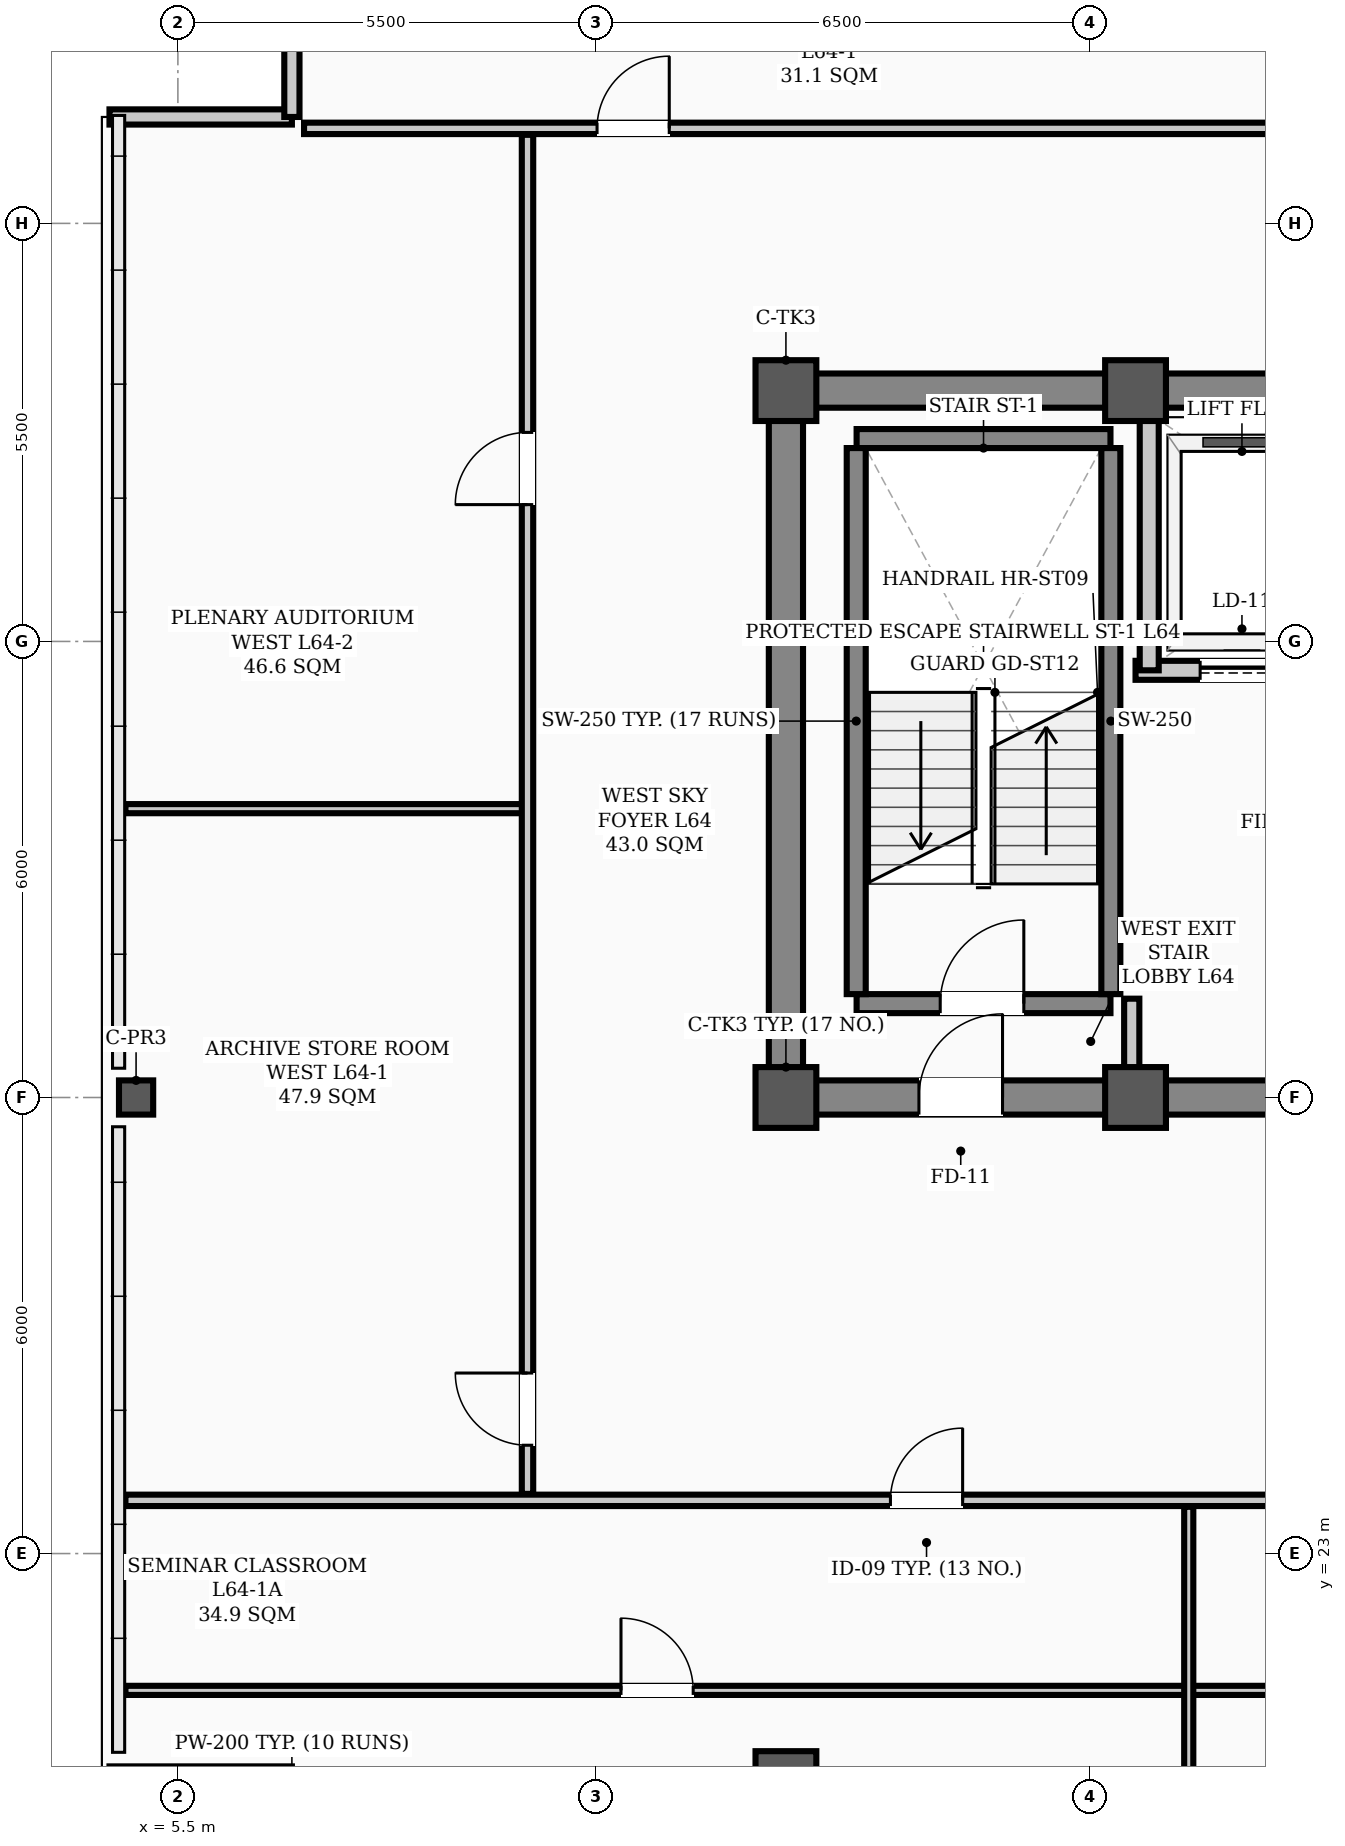
"""IFC4 building model, lengths in metres.
Left out: names, types, materials, properties, quantities, classifications, styles, units other than length and angle.
Written with IfcOpenShell. Run it as: python <this file> out.ifc"""

import sys

from ifc_helpers import new_model, si_unit, direction, frame, frame_2d, origin, origin_2d, place, context, subcontext, project, spatial, rectangle, hollow_rectangle, extrude, element, fill, save


model = new_model("IFC4")
c1 = context("Model", 3, precision=1e-05, world=origin(), true_north=direction((0.0, 1.0)))
c2 = subcontext(c1, "Body", "Model", "MODEL_VIEW")
j1 = project(units=[si_unit("LENGTHUNIT", "METRE"), si_unit("PLANEANGLEUNIT", "RADIAN")], contexts=[c1])
p1 = place(None, origin())
s1 = spatial("IfcSite", under=j1, at=p1, CompositionType="ELEMENT")
p2 = place(p1, origin())
s2 = spatial("IfcBuilding", under=s1, at=p2, CompositionType="ELEMENT")
p3 = place(p2, frame((0.0, 0.0, 257.9)))
s3 = spatial("IfcBuildingStorey", under=s2, at=p3, CompositionType="ELEMENT", Elevation=257.9)
for number, where, z_axis, x_axis in (
    (1, (13.5, 29.0, 0.0), (0.0, 0.0, 1.0), (1.0, 0.0, 0.0)),
    (2, (13.5, 38.3, 0.0), (0.0, 0.0, 1.0), (1.0, 0.0, 0.0)),
    (3, (18.1, 29.0, 0.0), (0.0, 0.0, 1.0), (1.0, 0.0, 0.0)),
    (4, (18.1, 38.3, 0.0), (0.0, 0.0, 1.0), (1.0, 0.0, 0.0)),
    (5, (13.5, 20.0, 0.0), (0.0, 0.0, 1.0), (1.0, 0.0, 0.0)),
):
    element("IfcColumn", number, at=place(p3, frame(where, z_axis=z_axis, x_axis=x_axis)), inside=s3, PredefinedType="COLUMN", context=c2, shape_type="SweptSolid", body=[
        extrude(hollow_rectangle(XDim=0.8, YDim=0.8, WallThickness=0.032, InnerFilletRadius=0.016, OuterFilletRadius=0.048, at=origin_2d()), origin(), (0.0, 0.0, 1.0), 3.9),
    ])
p4 = place(p3, frame((4.95, 29.0, 0.0), z_axis=(0.0, 0.0, 1.0), x_axis=(1.0, 0.0, 0.0)))
e6 = element("IfcColumn", 6, at=p4, inside=s3, PredefinedType="COLUMN", context=c2, shape_type="SweptSolid", body=[
    extrude(hollow_rectangle(XDim=0.45, YDim=0.45, WallThickness=0.022, InnerFilletRadius=0.022, OuterFilletRadius=0.044, at=origin_2d()), origin(), (0.0, 0.0, 1.0), 3.9),
])
for number, where, z_axis, x_axis in (
    (7, (4.6, 20.1, 0.0), (0.0, 0.0, 1.0), (1.0, 0.0, 0.0)),
    (8, (4.6, 41.9, 0.0), (0.0, 0.0, 1.0), (1.0, 0.0, 0.0)),
):
    element("IfcWall", number, at=place(p3, frame(where, z_axis=z_axis, x_axis=x_axis)), inside=s3, PredefinedType="PARAPET", context=c2, shape_type="SweptSolid", body=[
        extrude(rectangle(XDim=2.4, YDim=0.2, at=frame_2d((1.2, 0.0))), origin(), (0.0, 0.0, 1.0), 1.2),
    ])
p5 = place(p3, frame((7.0, 41.9, 0.0), z_axis=(0.0, 0.0, 1.0), x_axis=(0.0, 1.0, 0.0)))
e9 = element("IfcWall", 9, at=p5, inside=s3, PredefinedType="PARAPET", context=c2, shape_type="SweptSolid", body=[
    extrude(rectangle(XDim=2.4, YDim=0.2, at=frame_2d((1.2, 0.0))), origin(), (0.0, 0.0, 1.0), 1.2),
])
p6 = place(p3, frame((13.5, 29.0, 0.0), z_axis=(0.0, 0.0, 1.0), x_axis=(1.0, 0.0, 0.0)))
e10 = element("IfcWall", 10, at=p6, inside=s3, PredefinedType="SHEAR", context=c2, shape_type="SweptSolid", body=[
    extrude(rectangle(XDim=30.5, YDim=0.45, at=frame_2d((15.25, 0.0))), origin(), (0.0, 0.0, 1.0), 3.72),
])
p7 = place(p6, frame((1.75, 0.0, 0.0)))
e11 = element("IfcOpeningElement", 11, at=p7, cuts=e10, PredefinedType="OPENING", context=c2, shape_type="SweptSolid", body=[
    extrude(rectangle(XDim=1.1, YDim=2.08, at=frame_2d((0.55, 1.04))), frame((0.0, 0.235, 0.0), z_axis=(0.0, -1.0, 0.0), x_axis=(1.0, 0.0, 0.0)), (0.0, 0.0, 1.0), 0.47),
])
p8 = place(p6, frame((26.7, 0.0, 0.0)))
e12 = element("IfcOpeningElement", 12, at=p8, cuts=e10, PredefinedType="OPENING", context=c2, shape_type="SweptSolid", body=[
    extrude(rectangle(XDim=1.1, YDim=2.08, at=frame_2d((0.55, 1.04))), frame((0.0, 0.235, 0.0), z_axis=(0.0, -1.0, 0.0), x_axis=(1.0, 0.0, 0.0)), (0.0, 0.0, 1.0), 0.47),
])
p9 = place(p6, frame((6.8, 0.0, 0.0)))
e13 = element("IfcOpeningElement", 13, at=p9, cuts=e10, PredefinedType="OPENING", context=c2, shape_type="SweptSolid", body=[
    extrude(rectangle(XDim=1.1, YDim=2.08, at=frame_2d((0.55, 1.04))), frame((0.0, 0.235, 0.0), z_axis=(0.0, -1.0, 0.0), x_axis=(1.0, 0.0, 0.0)), (0.0, 0.0, 1.0), 0.47),
])
p10 = place(p6, frame((13.2, 0.0, 0.0)))
e14 = element("IfcOpeningElement", 14, at=p10, cuts=e10, PredefinedType="OPENING", context=c2, shape_type="SweptSolid", body=[
    extrude(rectangle(XDim=1.6, YDim=2.08, at=frame_2d((0.8, 1.04))), frame((0.0, 0.235, 0.0), z_axis=(0.0, -1.0, 0.0), x_axis=(1.0, 0.0, 0.0)), (0.0, 0.0, 1.0), 0.47),
])
p11 = place(p6, frame((19.53, 0.0, 0.0)))
e15 = element("IfcOpeningElement", 15, at=p11, cuts=e10, PredefinedType="OPENING", context=c2, shape_type="SweptSolid", body=[
    extrude(rectangle(XDim=0.9, YDim=2.08, at=frame_2d((0.45, 1.04))), frame((0.0, 0.235, 0.0), z_axis=(0.0, -1.0, 0.0), x_axis=(1.0, 0.0, 0.0)), (0.0, 0.0, 1.0), 0.47),
])
p12 = place(p6, frame((21.57, 0.0, 0.0)))
e16 = element("IfcOpeningElement", 16, at=p12, cuts=e10, PredefinedType="OPENING", context=c2, shape_type="SweptSolid", body=[
    extrude(rectangle(XDim=0.9, YDim=2.08, at=frame_2d((0.45, 1.04))), frame((0.0, 0.235, 0.0), z_axis=(0.0, -1.0, 0.0), x_axis=(1.0, 0.0, 0.0)), (0.0, 0.0, 1.0), 0.47),
])
p13 = place(p3, frame((13.5, 38.3, 0.0), z_axis=(0.0, 0.0, 1.0), x_axis=(1.0, 0.0, 0.0)))
e17 = element("IfcWall", 17, at=p13, inside=s3, PredefinedType="SHEAR", context=c2, shape_type="SweptSolid", body=[
    extrude(rectangle(XDim=30.5, YDim=0.45, at=frame_2d((15.25, 0.0))), origin(), (0.0, 0.0, 1.0), 3.72),
])
p14 = place(p3, frame((13.5, 29.35, 0.0), z_axis=(0.0, 0.0, 1.0), x_axis=(0.0, 1.0, 0.0)))
e18 = element("IfcWall", 18, at=p14, inside=s3, PredefinedType="SHEAR", context=c2, shape_type="SweptSolid", body=[
    extrude(rectangle(XDim=8.6, YDim=0.45, at=frame_2d((4.3, 0.0))), origin(), (0.0, 0.0, 1.0), 3.72),
])
p15 = place(p3, frame((14.43, 30.235, 0.0), z_axis=(0.0, 0.0, 1.0), x_axis=(1.0, 0.0, 0.0)))
e19 = element("IfcWall", 19, at=p15, inside=s3, PredefinedType="STANDARD", context=c2, shape_type="SweptSolid", body=[
    extrude(rectangle(XDim=3.34, YDim=0.25, at=frame_2d((1.67, 0.0))), origin(), (0.0, 0.0, 1.0), 3.72),
])
p16 = place(p15, frame((1.1, 0.0, 0.0)))
e20 = element("IfcOpeningElement", 20, at=p16, cuts=e19, PredefinedType="OPENING", context=c2, shape_type="SweptSolid", body=[
    extrude(rectangle(XDim=1.1, YDim=2.08, at=frame_2d((0.55, 1.04))), frame((0.0, 0.135, 0.0), z_axis=(0.0, -1.0, 0.0), x_axis=(1.0, 0.0, 0.0)), (0.0, 0.0, 1.0), 0.27),
])
p17 = place(p3, frame((14.43, 37.669, 0.0), z_axis=(0.0, 0.0, 1.0), x_axis=(1.0, 0.0, 0.0)))
e21 = element("IfcWall", 21, at=p17, inside=s3, PredefinedType="STANDARD", context=c2, shape_type="SweptSolid", body=[
    extrude(rectangle(XDim=3.34, YDim=0.25, at=frame_2d((1.67, 0.0))), origin(), (0.0, 0.0, 1.0), 3.72),
])
for number, where, z_axis, x_axis in (
    (22, (14.425, 30.36, 0.0), (0.0, 0.0, 1.0), (0.0, 1.0, 0.0)),
    (23, (17.775, 30.36, 0.0), (0.0, 0.0, 1.0), (0.0, 1.0, 0.0)),
):
    element("IfcWall", number, at=place(p3, frame(where, z_axis=z_axis, x_axis=x_axis)), inside=s3, PredefinedType="STANDARD", context=c2, shape_type="SweptSolid", body=[
        extrude(rectangle(XDim=7.184, YDim=0.25, at=frame_2d((3.592, 0.0))), origin(), (0.0, 0.0, 1.0), 3.72),
    ])
p18 = place(p3, frame((18.1, 34.62, 0.0), z_axis=(0.0, 0.0, 1.0), x_axis=(1.0, 0.0, 0.0)))
e24 = element("IfcWall", 24, at=p18, inside=s3, PredefinedType="STANDARD", context=c2, shape_type="SweptSolid", body=[
    extrude(rectangle(XDim=5.35, YDim=0.25, at=frame_2d((2.675, 0.0))), origin(), (0.0, 0.0, 1.0), 3.72),
])
p19 = place(p18, frame((0.85, 0.0, 0.0)))
e25 = element("IfcOpeningElement", 25, at=p19, cuts=e24, PredefinedType="OPENING", context=c2, shape_type="SweptSolid", body=[
    extrude(rectangle(XDim=1.1, YDim=2.08, at=frame_2d((0.55, 1.04))), frame((0.0, 0.135, 0.0), z_axis=(0.0, -1.0, 0.0), x_axis=(1.0, 0.0, 0.0)), (0.0, 0.0, 1.0), 0.27),
])
p20 = place(p18, frame((3.45, 0.0, 0.0)))
e26 = element("IfcOpeningElement", 26, at=p20, cuts=e24, PredefinedType="OPENING", context=c2, shape_type="SweptSolid", body=[
    extrude(rectangle(XDim=1.1, YDim=2.08, at=frame_2d((0.55, 1.04))), frame((0.0, 0.135, 0.0), z_axis=(0.0, -1.0, 0.0), x_axis=(1.0, 0.0, 0.0)), (0.0, 0.0, 1.0), 0.27),
])
p21 = place(p3, frame((18.28, 34.62, 0.0), z_axis=(0.0, 0.0, 1.0), x_axis=(0.0, 1.0, 0.0)))
e27 = element("IfcWall", 27, at=p21, inside=s3, PredefinedType="STANDARD", context=c2, shape_type="SweptSolid", body=[
    extrude(rectangle(XDim=3.33, YDim=0.25, at=frame_2d((1.665, 0.0))), origin(), (0.0, 0.0, 1.0), 3.4),
])
p22 = place(p3, frame((4.81, 23.7, 0.0), z_axis=(0.0, 0.0, 1.0), x_axis=(1.0, 0.0, 0.0)))
e28 = element("IfcWall", 28, at=p22, inside=s3, PredefinedType="PARTITIONING", context=c2, shape_type="SweptSolid", body=[
    extrude(rectangle(XDim=40.88, YDim=0.15, at=frame_2d((20.44, 0.0))), origin(), (0.0, 0.0, 1.0), 3.2),
])
p23 = place(p22, frame((10.065, 0.0, 0.0)))
e29 = element("IfcOpeningElement", 29, at=p23, cuts=e28, PredefinedType="OPENING", context=c2, shape_type="SweptSolid", body=[
    extrude(rectangle(XDim=0.95, YDim=2.08, at=frame_2d((0.475, 1.04))), frame((0.0, 0.085, 0.0), z_axis=(0.0, -1.0, 0.0), x_axis=(1.0, 0.0, 0.0)), (0.0, 0.0, 1.0), 0.17),
])
p24 = place(p22, frame((16.415, 0.0, 0.0)))
e30 = element("IfcOpeningElement", 30, at=p24, cuts=e28, PredefinedType="OPENING", context=c2, shape_type="SweptSolid", body=[
    extrude(rectangle(XDim=0.95, YDim=2.08, at=frame_2d((0.475, 1.04))), frame((0.0, 0.085, 0.0), z_axis=(0.0, -1.0, 0.0), x_axis=(1.0, 0.0, 0.0)), (0.0, 0.0, 1.0), 0.17),
])
p25 = place(p22, frame((23.815, 0.0, 0.0)))
e31 = element("IfcOpeningElement", 31, at=p25, cuts=e28, PredefinedType="OPENING", context=c2, shape_type="SweptSolid", body=[
    extrude(rectangle(XDim=0.95, YDim=2.08, at=frame_2d((0.475, 1.04))), frame((0.0, 0.085, 0.0), z_axis=(0.0, -1.0, 0.0), x_axis=(1.0, 0.0, 0.0)), (0.0, 0.0, 1.0), 0.17),
])
p26 = place(p22, frame((35.26, 0.0, 0.0)))
e32 = element("IfcOpeningElement", 32, at=p26, cuts=e28, PredefinedType="OPENING", context=c2, shape_type="SweptSolid", body=[
    extrude(rectangle(XDim=0.95, YDim=2.08, at=frame_2d((0.475, 1.04))), frame((0.0, 0.085, 0.0), z_axis=(0.0, -1.0, 0.0), x_axis=(1.0, 0.0, 0.0)), (0.0, 0.0, 1.0), 0.17),
])
p27 = place(p3, frame((4.81, 21.2, 0.0), z_axis=(0.0, 0.0, 1.0), x_axis=(1.0, 0.0, 0.0)))
e33 = element("IfcWall", 33, at=p27, inside=s3, PredefinedType="PARTITIONING", context=c2, shape_type="SweptSolid", body=[
    extrude(rectangle(XDim=13.99, YDim=0.12, at=frame_2d((6.995, 0.0))), origin(), (0.0, 0.0, 1.0), 3.2),
])
p28 = place(p27, frame((6.52, 0.0, 0.0)))
e34 = element("IfcOpeningElement", 34, at=p28, cuts=e33, PredefinedType="OPENING", context=c2, shape_type="SweptSolid", body=[
    extrude(rectangle(XDim=0.95, YDim=2.08, at=frame_2d((0.475, 1.04))), frame((0.0, 0.07, 0.0), z_axis=(0.0, -1.0, 0.0), x_axis=(1.0, 0.0, 0.0)), (0.0, 0.0, 1.0), 0.14),
])
p29 = place(p3, frame((18.8, 21.2, 0.0), z_axis=(0.0, 0.0, 1.0), x_axis=(1.0, 0.0, 0.0)))
e35 = element("IfcWall", 35, at=p29, inside=s3, PredefinedType="PARTITIONING", context=c2, shape_type="SweptSolid", body=[
    extrude(rectangle(XDim=5.8, YDim=0.12, at=frame_2d((2.9, 0.0))), origin(), (0.0, 0.0, 1.0), 3.2),
])
p30 = place(p29, frame((2.425, 0.0, 0.0)))
e36 = element("IfcOpeningElement", 36, at=p30, cuts=e35, PredefinedType="OPENING", context=c2, shape_type="SweptSolid", body=[
    extrude(rectangle(XDim=0.95, YDim=2.08, at=frame_2d((0.475, 1.04))), frame((0.0, 0.07, 0.0), z_axis=(0.0, -1.0, 0.0), x_axis=(1.0, 0.0, 0.0)), (0.0, 0.0, 1.0), 0.14),
])
p31 = place(p3, frame((4.81, 32.8, 0.0), z_axis=(0.0, 0.0, 1.0), x_axis=(1.0, 0.0, 0.0)))
e37 = element("IfcWall", 37, at=p31, inside=s3, PredefinedType="PARTITIONING", context=c2, shape_type="SweptSolid", body=[
    extrude(rectangle(XDim=5.29, YDim=0.12, at=frame_2d((2.645, 0.0))), origin(), (0.0, 0.0, 1.0), 3.72),
])
p32 = place(p3, frame((7.16, 41.75, 0.0), z_axis=(0.0, 0.0, 1.0), x_axis=(1.0, 0.0, 0.0)))
e38 = element("IfcWall", 38, at=p32, inside=s3, PredefinedType="PARTITIONING", context=c2, shape_type="SweptSolid", body=[
    extrude(rectangle(XDim=36.18, YDim=0.15, at=frame_2d((18.09, 0.0))), origin(), (0.0, 0.0, 1.0), 3.2),
])
p33 = place(p32, frame((3.855, 0.0, 0.0)))
e39 = element("IfcOpeningElement", 39, at=p33, cuts=e38, PredefinedType="OPENING", context=c2, shape_type="SweptSolid", body=[
    extrude(rectangle(XDim=0.95, YDim=2.08, at=frame_2d((0.475, 1.04))), frame((0.0, 0.085, 0.0), z_axis=(0.0, -1.0, 0.0), x_axis=(1.0, 0.0, 0.0)), (0.0, 0.0, 1.0), 0.17),
])
p34 = place(p32, frame((18.665, 0.0, 0.0)))
e40 = element("IfcOpeningElement", 40, at=p34, cuts=e38, PredefinedType="OPENING", context=c2, shape_type="SweptSolid", body=[
    extrude(rectangle(XDim=0.95, YDim=2.08, at=frame_2d((0.475, 1.04))), frame((0.0, 0.085, 0.0), z_axis=(0.0, -1.0, 0.0), x_axis=(1.0, 0.0, 0.0)), (0.0, 0.0, 1.0), 0.17),
])
p35 = place(p32, frame((26.765, 0.0, 0.0)))
e41 = element("IfcOpeningElement", 41, at=p35, cuts=e38, PredefinedType="OPENING", context=c2, shape_type="SweptSolid", body=[
    extrude(rectangle(XDim=0.95, YDim=2.08, at=frame_2d((0.475, 1.04))), frame((0.0, 0.085, 0.0), z_axis=(0.0, -1.0, 0.0), x_axis=(1.0, 0.0, 0.0)), (0.0, 0.0, 1.0), 0.17),
])
p36 = place(p32, frame((33.765, 0.0, 0.0)))
e42 = element("IfcOpeningElement", 42, at=p36, cuts=e38, PredefinedType="OPENING", context=c2, shape_type="SweptSolid", body=[
    extrude(rectangle(XDim=0.95, YDim=2.08, at=frame_2d((0.475, 1.04))), frame((0.0, 0.085, 0.0), z_axis=(0.0, -1.0, 0.0), x_axis=(1.0, 0.0, 0.0)), (0.0, 0.0, 1.0), 0.17),
])
p37 = place(p3, frame((18.05, 29.235, 0.0), z_axis=(0.0, 0.0, 1.0), x_axis=(0.0, 1.0, 0.0)))
e43 = element("IfcWall", 43, at=p37, inside=s3, PredefinedType="STANDARD", context=c2, shape_type="SweptSolid", body=[
    extrude(rectangle(XDim=1.065, YDim=0.2, at=frame_2d((0.532, 0.0))), origin(), (0.0, 0.0, 1.0), 3.4),
])
p38 = place(p3, frame((10.1, 23.785, 0.0), z_axis=(0.0, 0.0, 1.0), x_axis=(0.0, 1.0, 0.0)))
e44 = element("IfcWall", 44, at=p38, inside=s3, PredefinedType="PARTITIONING", context=c2, shape_type="SweptSolid", body=[
    extrude(rectangle(XDim=17.88, YDim=0.15, at=frame_2d((8.94, 0.0))), origin(), (0.0, 0.0, 1.0), 3.1),
])
p39 = place(p38, frame((0.64, 0.0, 0.0)))
e45 = element("IfcOpeningElement", 45, at=p39, cuts=e44, PredefinedType="OPENING", context=c2, shape_type="SweptSolid", body=[
    extrude(rectangle(XDim=0.95, YDim=2.08, at=frame_2d((0.475, 1.04))), frame((0.0, 0.085, 0.0), z_axis=(0.0, -1.0, 0.0), x_axis=(1.0, 0.0, 0.0)), (0.0, 0.0, 1.0), 0.17),
])
p40 = place(p38, frame((13.015, 0.0, 0.0)))
e46 = element("IfcOpeningElement", 46, at=p40, cuts=e44, PredefinedType="OPENING", context=c2, shape_type="SweptSolid", body=[
    extrude(rectangle(XDim=0.95, YDim=2.08, at=frame_2d((0.475, 1.04))), frame((0.0, 0.085, 0.0), z_axis=(0.0, -1.0, 0.0), x_axis=(1.0, 0.0, 0.0)), (0.0, 0.0, 1.0), 0.17),
])
p41 = place(p3, frame((18.8, 17.91, 0.0), z_axis=(0.0, 0.0, 1.0), x_axis=(0.0, 1.0, 0.0)))
e47 = element("IfcWall", 47, at=p41, inside=s3, PredefinedType="PARTITIONING", context=c2, shape_type="SweptSolid", body=[
    extrude(rectangle(XDim=5.705, YDim=0.12, at=frame_2d((2.853, 0.0))), origin(), (0.0, 0.0, 1.0), 3.1),
])
p42 = place(p16, origin())
e48 = element("IfcDoor", 48, at=p42, inside=s3, OperationType="SINGLE_SWING_RIGHT", PredefinedType="DOOR", context=c2, shape_type="SweptSolid", body=[
    extrude(rectangle(XDim=1.1, YDim=2.08, at=frame_2d((0.55, 1.04))), frame((0.0, 0.025, 0.0), z_axis=(0.0, -1.0, 0.0), x_axis=(1.0, 0.0, 0.0)), (0.0, 0.0, 1.0), 0.05),
])
fill(e20, e48)
p43 = place(p7, origin())
e49 = element("IfcDoor", 49, at=p43, inside=s3, OperationType="SINGLE_SWING_RIGHT", PredefinedType="DOOR", context=c2, shape_type="SweptSolid", body=[
    extrude(rectangle(XDim=1.1, YDim=2.08, at=frame_2d((0.55, 1.04))), frame((0.0, 0.025, 0.0), z_axis=(0.0, -1.0, 0.0), x_axis=(1.0, 0.0, 0.0)), (0.0, 0.0, 1.0), 0.05),
])
fill(e11, e49)
p44 = place(p28, origin())
e50 = element("IfcDoor", 50, at=p44, inside=s3, OperationType="SINGLE_SWING_LEFT", PredefinedType="DOOR", context=c2, shape_type="SweptSolid", body=[
    extrude(rectangle(XDim=0.95, YDim=2.08, at=frame_2d((0.475, 1.04))), frame((0.0, 0.025, 0.0), z_axis=(0.0, -1.0, 0.0), x_axis=(1.0, 0.0, 0.0)), (0.0, 0.0, 1.0), 0.05),
])
fill(e34, e50)
p45 = place(p23, origin())
e51 = element("IfcDoor", 51, at=p45, inside=s3, OperationType="SINGLE_SWING_RIGHT", PredefinedType="DOOR", context=c2, shape_type="SweptSolid", body=[
    extrude(rectangle(XDim=0.95, YDim=2.08, at=frame_2d((0.475, 1.04))), frame((0.0, 0.025, 0.0), z_axis=(0.0, -1.0, 0.0), x_axis=(1.0, 0.0, 0.0)), (0.0, 0.0, 1.0), 0.05),
])
fill(e29, e51)
p46 = place(p39, origin())
e52 = element("IfcDoor", 52, at=p46, inside=s3, OperationType="SINGLE_SWING_RIGHT", PredefinedType="DOOR", context=c2, shape_type="SweptSolid", body=[
    extrude(rectangle(XDim=0.95, YDim=2.08, at=frame_2d((0.475, 1.04))), frame((0.0, 0.025, 0.0), z_axis=(0.0, -1.0, 0.0), x_axis=(1.0, 0.0, 0.0)), (0.0, 0.0, 1.0), 0.05),
])
fill(e45, e52)
p47 = place(p40, origin())
e53 = element("IfcDoor", 53, at=p47, inside=s3, OperationType="SINGLE_SWING_LEFT", PredefinedType="DOOR", context=c2, shape_type="SweptSolid", body=[
    extrude(rectangle(XDim=0.95, YDim=2.08, at=frame_2d((0.475, 1.04))), frame((0.0, 0.025, 0.0), z_axis=(0.0, -1.0, 0.0), x_axis=(1.0, 0.0, 0.0)), (0.0, 0.0, 1.0), 0.05),
])
fill(e46, e53)
p48 = place(p33, origin())
e54 = element("IfcDoor", 54, at=p48, inside=s3, OperationType="SINGLE_SWING_RIGHT", PredefinedType="DOOR", context=c2, shape_type="SweptSolid", body=[
    extrude(rectangle(XDim=0.95, YDim=2.08, at=frame_2d((0.475, 1.04))), frame((0.0, 0.025, 0.0), z_axis=(0.0, -1.0, 0.0), x_axis=(1.0, 0.0, 0.0)), (0.0, 0.0, 1.0), 0.05),
])
fill(e39, e54)
p49 = place(p19, origin())
e55 = element("IfcDoor", 55, at=p49, inside=s3, OperationType="SLIDING_TO_LEFT", PredefinedType="DOOR", context=c2, shape_type="SweptSolid", body=[
    extrude(rectangle(XDim=1.1, YDim=2.08, at=frame_2d((0.55, 1.04))), frame((0.0, 0.025, 0.0), z_axis=(0.0, -1.0, 0.0), x_axis=(1.0, 0.0, 0.0)), (0.0, 0.0, 1.0), 0.05),
])
fill(e25, e55)
save(model, sys.argv[1])
